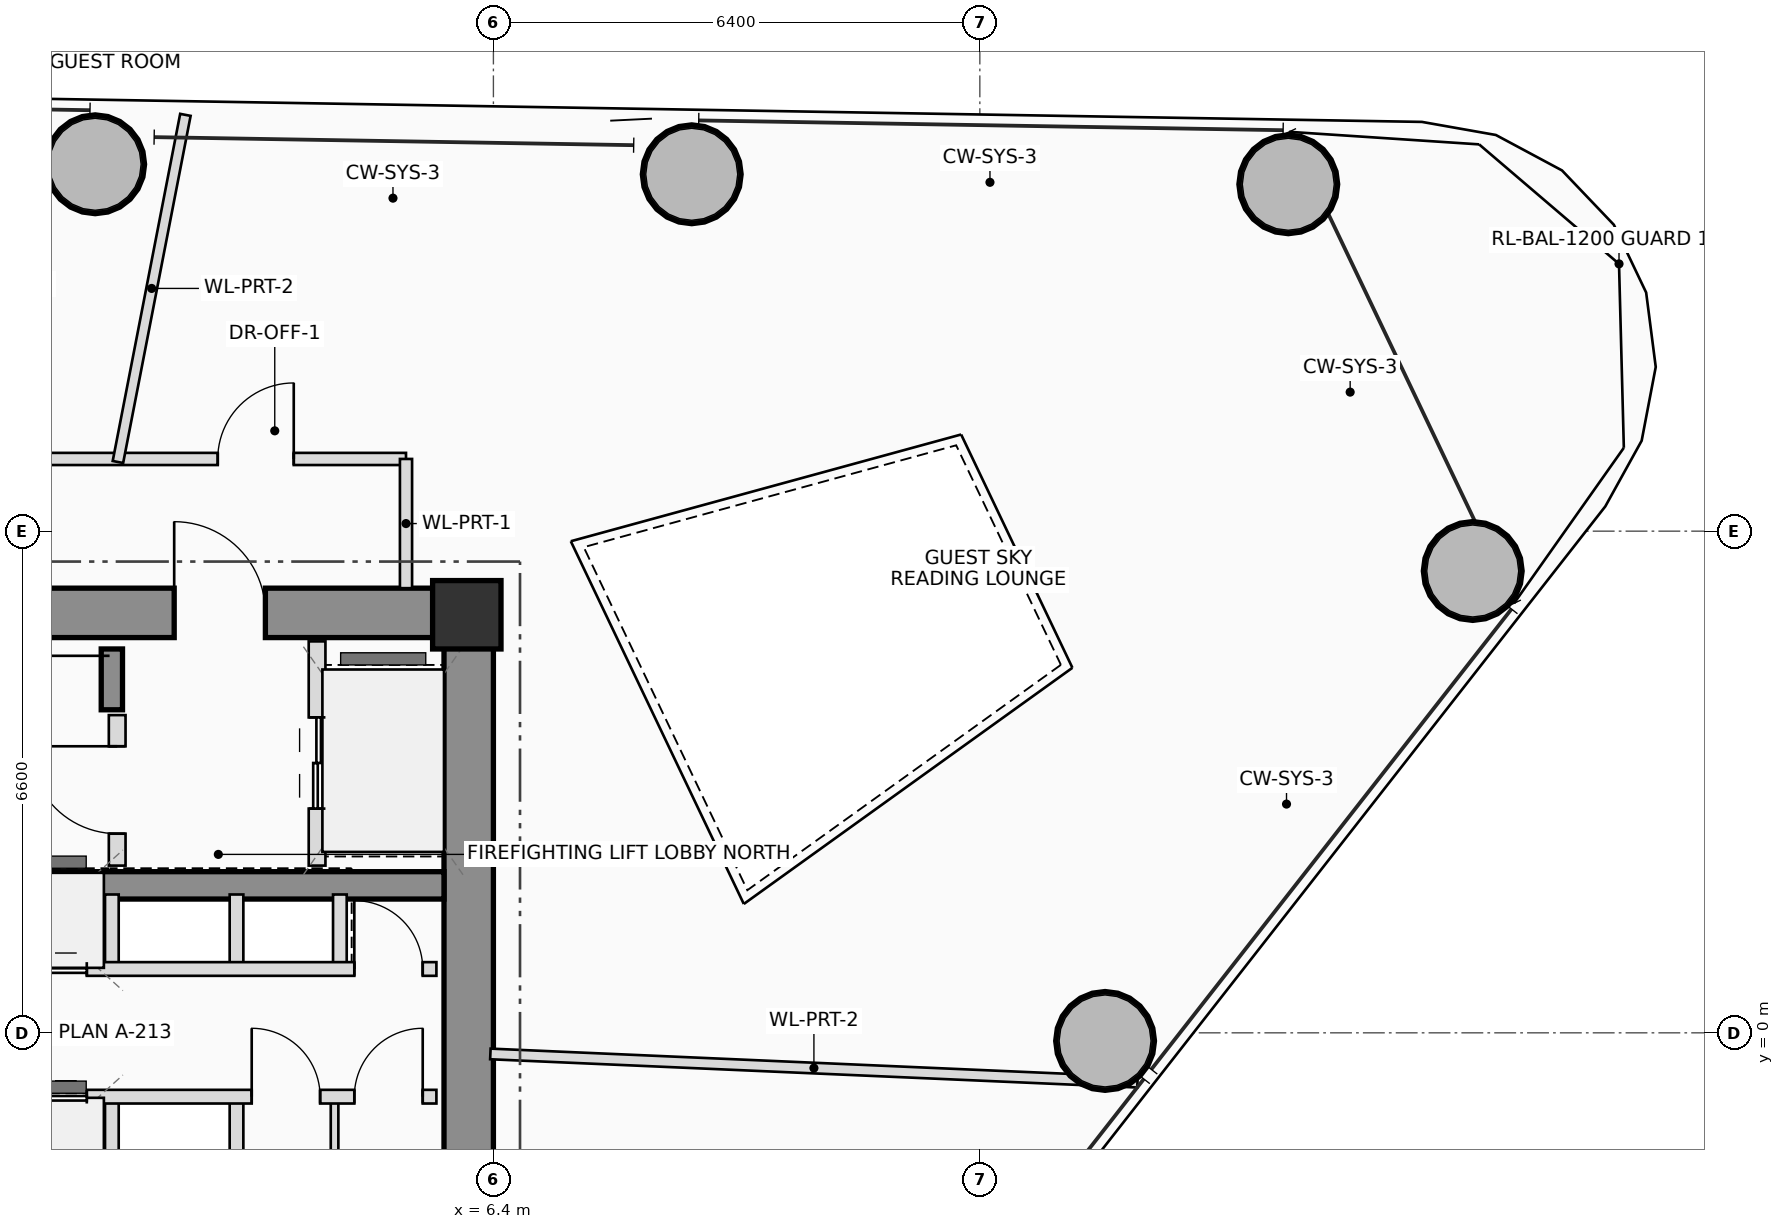
"""IFC4 building model, lengths in metres.
Left out: names, types, materials, properties, quantities, classifications, styles, units other than length and angle.
Written with IfcOpenShell. Run it as: python <this file> out.ifc"""

import sys

from ifc_helpers import new_model, si_unit, direction, frame, frame_2d, origin, origin_2d, place, context, subcontext, project, spatial, rectangle, hollow_circle, extrude, source, transform, mapped, element, fill, save


model = new_model("IFC4")
c1 = context("Model", 3, precision=1e-05, world=origin(), true_north=direction((0.0, 1.0)))
c2 = subcontext(c1, "Body", "Model", "MODEL_VIEW")
j1 = project(units=[si_unit("LENGTHUNIT", "METRE"), si_unit("PLANEANGLEUNIT", "RADIAN")], contexts=[c1])
p1 = place(None, origin())
s1 = spatial("IfcSite", under=j1, at=p1, CompositionType="ELEMENT")
p2 = place(p1, origin())
s2 = spatial("IfcBuilding", under=s1, at=p2, CompositionType="ELEMENT")
p3 = place(p2, frame((0.0, 0.0, 132.95)))
s3 = spatial("IfcBuildingStorey", under=s2, at=p3, CompositionType="ELEMENT", Elevation=132.95)
m1 = source(origin(), c2, "Body", "SweptSolid", [
    extrude(rectangle(XDim=0.9, YDim=0.9, at=origin_2d()), origin(), (0.0, 0.0, 1.0), 3.45),
])
p4 = place(p3, frame((6.05, 5.5, 0.0), z_axis=(0.0, 0.0, 1.0), x_axis=(1.0, 0.0, 0.0)))
e1 = element("IfcColumn", 1, at=p4, inside=s3, PredefinedType="COLUMN", context=c2, shape_type="MappedRepresentation", body=[
    mapped(m1, transform((0.0, 0.0, 0.0), scale=1.0)),
])
p5 = place(p3, frame((-6.4, 5.525, 0.0), z_axis=(0.0, 0.0, 1.0), x_axis=(1.0, 0.0, 0.0)))
e2 = element("IfcWall", 2, at=p5, inside=s3, PredefinedType="SHEAR", context=c2, shape_type="SweptSolid", body=[
    extrude(rectangle(XDim=12.8, YDim=0.65, at=frame_2d((6.4, 0.0))), origin(), (0.0, 0.0, 1.0), 3.45),
])
p6 = place(p5, frame((8.6, 0.0, 0.0)))
e3 = element("IfcOpeningElement", 3, at=p6, cuts=e2, PredefinedType="OPENING", context=c2, shape_type="SweptSolid", body=[
    extrude(rectangle(XDim=1.2, YDim=2.2, at=frame_2d((0.6, 1.1))), frame((0.0, 0.335, 0.0), z_axis=(0.0, -1.0, 0.0), x_axis=(1.0, 0.0, 0.0)), (0.0, 0.0, 1.0), 0.67),
])
p7 = place(p3, frame((6.075, -5.2, 0.0), z_axis=(0.0, 0.0, 1.0), x_axis=(0.0, 1.0, 0.0)))
e4 = element("IfcWall", 4, at=p7, inside=s3, PredefinedType="SHEAR", context=c2, shape_type="SweptSolid", body=[
    extrude(rectangle(XDim=10.4, YDim=0.65, at=frame_2d((5.2, 0.0))), origin(), (0.0, 0.0, 1.0), 3.45),
])
p8 = place(p3, frame((-5.75, 1.94, 0.0), z_axis=(0.0, 0.0, 1.0), x_axis=(1.0, 0.0, 0.0)))
e5 = element("IfcWall", 5, at=p8, inside=s3, PredefinedType="SHEAR", context=c2, shape_type="SweptSolid", body=[
    extrude(rectangle(XDim=11.5, YDim=0.36, at=frame_2d((5.75, 0.0))), origin(), (0.0, 0.0, 1.0), 3.45),
])
p9 = place(p3, frame((1.38, 4.25, 0.0), z_axis=(0.0, 0.0, 1.0), x_axis=(0.0, 1.0, 0.0)))
e6 = element("IfcWall", 6, at=p9, inside=s3, PredefinedType="SHEAR", context=c2, shape_type="SweptSolid", body=[
    extrude(rectangle(XDim=0.8, YDim=0.28, at=frame_2d((0.4, 0.0))), origin(), (0.0, 0.0, 1.0), 3.45),
])
m2 = source(origin(), c2, "Body", "SweptSolid", [
    extrude(hollow_circle(Radius=0.65, WallThickness=0.045, at=origin_2d()), origin(), (0.0, 0.0, 1.0), 3.45),
])
for number, where, z_axis, x_axis in (
    (7, (14.448, -0.107, 0.0), (0.0, 0.0, 1.0), (1.0, 0.0, 0.0)),
    (8, (19.285, 6.076, 0.0), (0.0, 0.0, 1.0), (1.0, 0.0, 0.0)),
    (9, (16.858, 11.164, 0.0), (0.0, 0.0, 1.0), (1.0, 0.0, 0.0)),
    (10, (9.01, 11.295, 0.0), (0.0, 0.0, 1.0), (1.0, 0.0, 0.0)),
    (11, (1.16, 11.427, 0.0), (0.0, 0.0, 1.0), (1.0, 0.0, 0.0)),
):
    element("IfcColumn", number, at=place(p3, frame(where, z_axis=z_axis, x_axis=x_axis)), inside=s3, PredefinedType="COLUMN", context=c2, shape_type="MappedRepresentation", body=[
        mapped(m2, transform((0.0, 0.0, 0.0), scale=1.0)),
    ])
p10 = place(p3, frame((1.45, 2.2, 0.0), z_axis=(0.0, 0.0, 1.0), x_axis=(0.0, 1.0, 0.0)))
e12 = element("IfcWall", 12, at=p10, inside=s3, PredefinedType="PLUMBINGWALL", context=c2, shape_type="SweptSolid", body=[
    extrude(rectangle(XDim=1.98, YDim=0.22, at=frame_2d((0.99, 0.0))), origin(), (0.0, 0.0, 1.0), 3.25),
])
p11 = place(p10, frame((0.42, 0.0, 0.0)))
e13 = element("IfcOpeningElement", 13, at=p11, cuts=e12, PredefinedType="OPENING", context=c2, shape_type="SweptSolid", body=[
    extrude(rectangle(XDim=1.15, YDim=2.15, at=frame_2d((0.575, 1.075))), frame((0.0, 0.12, 0.0), z_axis=(0.0, -1.0, 0.0), x_axis=(1.0, 0.0, 0.0)), (0.0, 0.0, 1.0), 0.24),
])
p12 = place(p3, frame((4.08, 2.2, 0.0), z_axis=(0.0, 0.0, 1.0), x_axis=(0.0, 1.0, 0.0)))
e14 = element("IfcWall", 14, at=p12, inside=s3, PredefinedType="PLUMBINGWALL", context=c2, shape_type="SweptSolid", body=[
    extrude(rectangle(XDim=2.95, YDim=0.22, at=frame_2d((1.475, 0.0))), origin(), (0.0, 0.0, 1.0), 3.25),
])
p13 = place(p12, frame((0.75, 0.0, 0.0)))
e15 = element("IfcOpeningElement", 15, at=p13, cuts=e14, PredefinedType="OPENING", context=c2, shape_type="SweptSolid", body=[
    extrude(rectangle(XDim=1.2, YDim=2.25, at=frame_2d((0.6, 1.125))), frame((0.0, 0.12, 0.0), z_axis=(0.0, -1.0, 0.0), x_axis=(1.0, 0.0, 0.0)), (0.0, 0.0, 1.0), 0.24),
])
for number, where, z_axis, x_axis in (
    (16, (1.38, 0.84, 0.0), (0.0, 0.0, 1.0), (0.0, 1.0, 0.0)),
    (17, (1.38, -1.82, 0.0), (0.0, 0.0, 1.0), (0.0, 1.0, 0.0)),
    (18, (3.02, 0.84, 0.0), (0.0, 0.0, 1.0), (0.0, 1.0, 0.0)),
    (19, (4.38, 0.84, 0.0), (0.0, 0.0, 1.0), (0.0, 1.0, 0.0)),
    (20, (3.02, -1.82, 0.0), (0.0, 0.0, 1.0), (0.0, 1.0, 0.0)),
):
    element("IfcWall", number, at=place(p3, frame(where, z_axis=z_axis, x_axis=x_axis)), inside=s3, PredefinedType="PLUMBINGWALL", context=c2, shape_type="SweptSolid", body=[
        extrude(rectangle(XDim=0.98, YDim=0.18, at=frame_2d((0.49, 0.0))), origin(), (0.0, 0.0, 1.0), 3.25),
    ])
p14 = place(p3, frame((4.31, -1.82, 0.0), z_axis=(0.0, 0.0, 1.0), x_axis=(0.0, 1.0, 0.0)))
e21 = element("IfcWall", 21, at=p14, inside=s3, PredefinedType="PARTITIONING", context=c2, shape_type="SweptSolid", body=[
    extrude(rectangle(XDim=0.98, YDim=0.1, at=frame_2d((0.49, 0.0))), origin(), (0.0, 0.0, 1.0), 3.25),
])
p15 = place(p3, frame((-5.68, 0.84, 0.0), z_axis=(0.0, 0.0, 1.0), x_axis=(1.0, 0.0, 0.0)))
e22 = element("IfcWall", 22, at=p15, inside=s3, PredefinedType="PLUMBINGWALL", context=c2, shape_type="SweptSolid", body=[
    extrude(rectangle(XDim=11.33, YDim=0.18, at=frame_2d((5.665, 0.0))), origin(), (0.0, 0.0, 1.0), 3.25),
])
p16 = place(p15, frame((1.58, 0.0, 0.0)))
e23 = element("IfcOpeningElement", 23, at=p16, cuts=e22, PredefinedType="OPENING", context=c2, shape_type="SweptSolid", body=[
    extrude(rectangle(XDim=0.92, YDim=2.1, at=frame_2d((0.46, 1.05))), frame((0.0, 0.1, 0.0), z_axis=(0.0, -1.0, 0.0), x_axis=(1.0, 0.0, 0.0)), (0.0, 0.0, 1.0), 0.2),
])
p17 = place(p15, frame((3.93, 0.0, 0.0)))
e24 = element("IfcOpeningElement", 24, at=p17, cuts=e22, PredefinedType="OPENING", context=c2, shape_type="SweptSolid", body=[
    extrude(rectangle(XDim=1.1, YDim=2.2, at=frame_2d((0.55, 1.1))), frame((0.0, 0.1, 0.0), z_axis=(0.0, -1.0, 0.0), x_axis=(1.0, 0.0, 0.0)), (0.0, 0.0, 1.0), 0.2),
])
p18 = place(p15, frame((5.63, 0.0, 0.0)))
e25 = element("IfcOpeningElement", 25, at=p18, cuts=e22, PredefinedType="OPENING", context=c2, shape_type="SweptSolid", body=[
    extrude(rectangle(XDim=1.1, YDim=2.2, at=frame_2d((0.55, 1.1))), frame((0.0, 0.1, 0.0), z_axis=(0.0, -1.0, 0.0), x_axis=(1.0, 0.0, 0.0)), (0.0, 0.0, 1.0), 0.2),
])
p19 = place(p15, frame((10.25, 0.0, 0.0)))
e26 = element("IfcOpeningElement", 26, at=p19, cuts=e22, PredefinedType="OPENING", context=c2, shape_type="SweptSolid", body=[
    extrude(rectangle(XDim=0.9, YDim=2.05, at=frame_2d((0.45, 1.025))), frame((0.0, 0.1, 0.0), z_axis=(0.0, -1.0, 0.0), x_axis=(1.0, 0.0, 0.0)), (0.0, 0.0, 1.0), 0.2),
])
p20 = place(p3, frame((-5.68, -0.84, 0.0), z_axis=(0.0, 0.0, 1.0), x_axis=(1.0, 0.0, 0.0)))
e27 = element("IfcWall", 27, at=p20, inside=s3, PredefinedType="PLUMBINGWALL", context=c2, shape_type="SweptSolid", body=[
    extrude(rectangle(XDim=11.33, YDim=0.18, at=frame_2d((5.665, 0.0))), origin(), (0.0, 0.0, 1.0), 3.25),
])
p21 = place(p20, frame((1.18, 0.0, 0.0)))
e28 = element("IfcOpeningElement", 28, at=p21, cuts=e27, PredefinedType="OPENING", context=c2, shape_type="SweptSolid", body=[
    extrude(rectangle(XDim=0.9, YDim=2.05, at=frame_2d((0.45, 1.025))), frame((0.0, 0.1, 0.0), z_axis=(0.0, -1.0, 0.0), x_axis=(1.0, 0.0, 0.0)), (0.0, 0.0, 1.0), 0.2),
])
p22 = place(p20, frame((3.93, 0.0, 0.0)))
e29 = element("IfcOpeningElement", 29, at=p22, cuts=e27, PredefinedType="OPENING", context=c2, shape_type="SweptSolid", body=[
    extrude(rectangle(XDim=1.1, YDim=2.2, at=frame_2d((0.55, 1.1))), frame((0.0, 0.1, 0.0), z_axis=(0.0, -1.0, 0.0), x_axis=(1.0, 0.0, 0.0)), (0.0, 0.0, 1.0), 0.2),
])
p23 = place(p20, frame((5.63, 0.0, 0.0)))
e30 = element("IfcOpeningElement", 30, at=p23, cuts=e27, PredefinedType="OPENING", context=c2, shape_type="SweptSolid", body=[
    extrude(rectangle(XDim=1.1, YDim=2.2, at=frame_2d((0.55, 1.1))), frame((0.0, 0.1, 0.0), z_axis=(0.0, -1.0, 0.0), x_axis=(1.0, 0.0, 0.0)), (0.0, 0.0, 1.0), 0.2),
])
p24 = place(p20, frame((8.9, 0.0, 0.0)))
e31 = element("IfcOpeningElement", 31, at=p24, cuts=e27, PredefinedType="OPENING", context=c2, shape_type="SweptSolid", body=[
    extrude(rectangle(XDim=0.9, YDim=2.05, at=frame_2d((0.45, 1.025))), frame((0.0, 0.1, 0.0), z_axis=(0.0, -1.0, 0.0), x_axis=(1.0, 0.0, 0.0)), (0.0, 0.0, 1.0), 0.2),
])
p25 = place(p20, frame((10.25, 0.0, 0.0)))
e32 = element("IfcOpeningElement", 32, at=p25, cuts=e27, PredefinedType="OPENING", context=c2, shape_type="SweptSolid", body=[
    extrude(rectangle(XDim=0.9, YDim=2.05, at=frame_2d((0.45, 1.025))), frame((0.0, 0.1, 0.0), z_axis=(0.0, -1.0, 0.0), x_axis=(1.0, 0.0, 0.0)), (0.0, 0.0, 1.0), 0.2),
])
p26 = place(p3, frame((-6.36, 7.55, 0.0), z_axis=(0.0, 0.0, 1.0), x_axis=(1.0, 0.0, 0.0)))
e33 = element("IfcWall", 33, at=p26, inside=s3, PredefinedType="PARTITIONING", context=c2, shape_type="SweptSolid", body=[
    extrude(rectangle(XDim=11.61, YDim=0.16, at=frame_2d((5.805, 0.0))), origin(), (0.0, 0.0, 1.0), 2.605),
])
p27 = place(p26, frame((4.33, 0.0, 0.0)))
e34 = element("IfcOpeningElement", 34, at=p27, cuts=e33, PredefinedType="OPENING", context=c2, shape_type="SweptSolid", body=[
    extrude(rectangle(XDim=1.05, YDim=2.2, at=frame_2d((0.525, 1.1))), frame((0.0, 0.09, 0.0), z_axis=(0.0, -1.0, 0.0), x_axis=(1.0, 0.0, 0.0)), (0.0, 0.0, 1.0), 0.18),
])
p28 = place(p26, frame((9.133, 0.0, 0.0)))
e35 = element("IfcOpeningElement", 35, at=p28, cuts=e33, PredefinedType="OPENING", context=c2, shape_type="SweptSolid", body=[
    extrude(rectangle(XDim=1.0, YDim=2.25, at=frame_2d((0.5, 1.125))), frame((0.0, 0.09, 0.0), z_axis=(0.0, -1.0, 0.0), x_axis=(1.0, 0.0, 0.0)), (0.0, 0.0, 1.0), 0.18),
])
p29 = place(p3, frame((5.25, 7.55, 0.0), z_axis=(0.0, 0.0, 1.0), x_axis=(0.0, -1.0, 0.0)))
e36 = element("IfcWall", 36, at=p29, inside=s3, PredefinedType="PARTITIONING", context=c2, shape_type="SweptSolid", body=[
    extrude(rectangle(XDim=1.7, YDim=0.16, at=frame_2d((0.85, 0.0))), origin(), (0.0, 0.0, 1.0), 2.605),
])
p30 = place(p3, frame((6.36, -0.278, 0.0), z_axis=(0.0, 0.0, 1.0), x_axis=(0.999047707238, -0.043631166178, 0.0)))
e37 = element("IfcWall", 37, at=p30, inside=s3, PredefinedType="PARTITIONING", context=c2, shape_type="SweptSolid", body=[
    extrude(rectangle(XDim=8.522, YDim=0.14, at=frame_2d((4.261, 0.0))), origin(), (0.0, 0.0, 1.0), 2.605),
])
p31 = place(p3, frame((1.46, 7.51, 0.0), z_axis=(0.0, 0.0, 1.0), x_axis=(0.19080504805, 0.981627950722, 0.0)))
e38 = element("IfcWall", 38, at=p31, inside=s3, PredefinedType="PARTITIONING", context=c2, shape_type="SweptSolid", body=[
    extrude(rectangle(XDim=4.652, YDim=0.14, at=frame_2d((2.326, 0.0))), origin(), (0.0, 0.0, 1.0), 2.605),
])
p32 = place(p6, origin())
e39 = element("IfcDoor", 39, at=p32, inside=s3, OperationType="SINGLE_SWING_LEFT", PredefinedType="DOOR", context=c2, shape_type="SweptSolid", body=[
    extrude(rectangle(XDim=1.2, YDim=2.2, at=frame_2d((0.6, 1.1))), frame((0.0, 0.025, 0.0), z_axis=(0.0, -1.0, 0.0), x_axis=(1.0, 0.0, 0.0)), (0.0, 0.0, 1.0), 0.05),
])
fill(e3, e39)
p33 = place(p11, origin())
e40 = element("IfcDoor", 40, at=p33, inside=s3, OperationType="SINGLE_SWING_RIGHT", PredefinedType="DOOR", context=c2, shape_type="SweptSolid", body=[
    extrude(rectangle(XDim=1.15, YDim=2.15, at=frame_2d((0.575, 1.075))), frame((0.0, 0.025, 0.0), z_axis=(0.0, -1.0, 0.0), x_axis=(1.0, 0.0, 0.0)), (0.0, 0.0, 1.0), 0.05),
])
fill(e13, e40)
p34 = place(p13, origin())
e41 = element("IfcDoor", 41, at=p34, inside=s3, OperationType="DOUBLE_DOOR_SLIDING", PredefinedType="DOOR", context=c2, shape_type="SweptSolid", body=[
    extrude(rectangle(XDim=1.2, YDim=2.25, at=frame_2d((0.6, 1.125))), frame((0.0, 0.025, 0.0), z_axis=(0.0, -1.0, 0.0), x_axis=(1.0, 0.0, 0.0)), (0.0, 0.0, 1.0), 0.05),
])
fill(e15, e41)
p35 = place(p18, origin())
e42 = element("IfcDoor", 42, at=p35, inside=s3, OperationType="DOUBLE_DOOR_SLIDING", PredefinedType="DOOR", context=c2, shape_type="SweptSolid", body=[
    extrude(rectangle(XDim=1.1, YDim=2.2, at=frame_2d((0.55, 1.1))), frame((0.0, 0.025, 0.0), z_axis=(0.0, -1.0, 0.0), x_axis=(1.0, 0.0, 0.0)), (0.0, 0.0, 1.0), 0.05),
])
fill(e25, e42)
p36 = place(p19, origin())
e43 = element("IfcDoor", 43, at=p36, inside=s3, OperationType="SINGLE_SWING_LEFT", PredefinedType="DOOR", context=c2, shape_type="SweptSolid", body=[
    extrude(rectangle(XDim=0.9, YDim=2.05, at=frame_2d((0.45, 1.025))), frame((0.0, 0.025, 0.0), z_axis=(0.0, -1.0, 0.0), x_axis=(1.0, 0.0, 0.0)), (0.0, 0.0, 1.0), 0.05),
])
fill(e26, e43)
p37 = place(p23, origin())
e44 = element("IfcDoor", 44, at=p37, inside=s3, OperationType="DOUBLE_DOOR_SLIDING", PredefinedType="DOOR", context=c2, shape_type="SweptSolid", body=[
    extrude(rectangle(XDim=1.1, YDim=2.2, at=frame_2d((0.55, 1.1))), frame((0.0, 0.025, 0.0), z_axis=(0.0, -1.0, 0.0), x_axis=(1.0, 0.0, 0.0)), (0.0, 0.0, 1.0), 0.05),
])
fill(e30, e44)
p38 = place(p24, origin())
e45 = element("IfcDoor", 45, at=p38, inside=s3, OperationType="SINGLE_SWING_LEFT", PredefinedType="DOOR", context=c2, shape_type="SweptSolid", body=[
    extrude(rectangle(XDim=0.9, YDim=2.05, at=frame_2d((0.45, 1.025))), frame((0.0, 0.025, 0.0), z_axis=(0.0, -1.0, 0.0), x_axis=(1.0, 0.0, 0.0)), (0.0, 0.0, 1.0), 0.05),
])
fill(e31, e45)
p39 = place(p25, origin())
e46 = element("IfcDoor", 46, at=p39, inside=s3, OperationType="SINGLE_SWING_RIGHT", PredefinedType="DOOR", context=c2, shape_type="SweptSolid", body=[
    extrude(rectangle(XDim=0.9, YDim=2.05, at=frame_2d((0.45, 1.025))), frame((0.0, 0.025, 0.0), z_axis=(0.0, -1.0, 0.0), x_axis=(1.0, 0.0, 0.0)), (0.0, 0.0, 1.0), 0.05),
])
fill(e32, e46)
p40 = place(p28, origin())
e47 = element("IfcDoor", 47, at=p40, inside=s3, OperationType="SINGLE_SWING_RIGHT", PredefinedType="DOOR", context=c2, shape_type="SweptSolid", body=[
    extrude(rectangle(XDim=1.0, YDim=2.25, at=frame_2d((0.5, 1.125))), frame((0.0, 0.025, 0.0), z_axis=(0.0, -1.0, 0.0), x_axis=(1.0, 0.0, 0.0)), (0.0, 0.0, 1.0), 0.05),
])
fill(e35, e47)
save(model, sys.argv[1])
